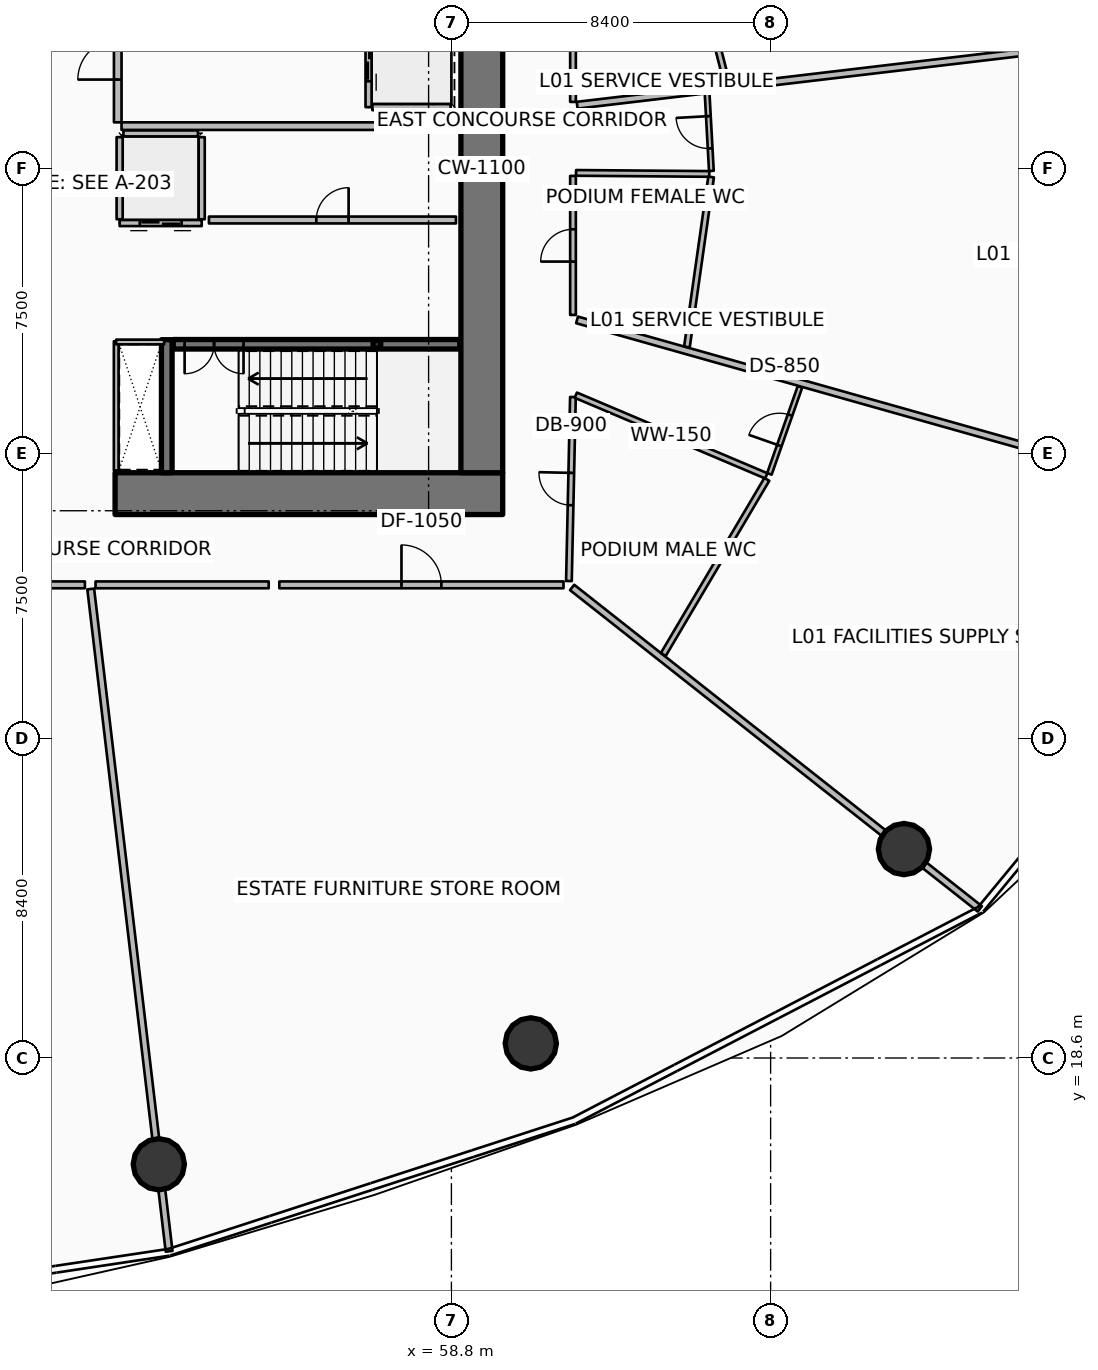
"""IFC4 building model, lengths in metres.
Left out: names, types, materials, properties, quantities, classifications, styles, units other than length and angle.
Written with IfcOpenShell. Run it as: python <this file> out.ifc"""

import sys

from ifc_helpers import new_model, si_unit, direction, frame, frame_2d, origin, origin_2d, place, context, subcontext, project, spatial, rectangle, hollow_rectangle, circle, extrude, element, fill, save


model = new_model("IFC4")
c1 = context("Model", 3, precision=1e-05, world=origin(), true_north=direction((0.0, 1.0)))
c2 = subcontext(c1, "Body", "Model", "MODEL_VIEW")
j1 = project(units=[si_unit("LENGTHUNIT", "METRE"), si_unit("PLANEANGLEUNIT", "RADIAN")], contexts=[c1])
p1 = place(None, origin())
s1 = spatial("IfcSite", under=j1, at=p1, CompositionType="ELEMENT")
p2 = place(p1, origin())
s2 = spatial("IfcBuilding", under=s1, at=p2, CompositionType="ELEMENT")
p3 = place(p2, frame((0.0, 0.0, 7.2)))
s3 = spatial("IfcBuildingStorey", under=s2, at=p3, CompositionType="ELEMENT", Elevation=7.2)
p4 = place(p3, frame((49.95, 33.45, 0.0), z_axis=(0.0, 0.0, 1.0), x_axis=(1.0, 0.0, 0.0)))
e1 = element("IfcWall", 1, at=p4, inside=s3, PredefinedType="SHEAR", context=c2, shape_type="SweptSolid", body=[
    extrude(rectangle(XDim=10.2, YDim=1.1, at=frame_2d((5.1, 0.0))), origin(), (0.0, 0.0, 1.0), 4.8),
])
p5 = place(p3, frame((59.6, 34.0, 0.0), z_axis=(0.0, 0.0, 1.0), x_axis=(0.0, 1.0, 0.0)))
e2 = element("IfcWall", 2, at=p5, inside=s3, PredefinedType="SHEAR", context=c2, shape_type="SweptSolid", body=[
    extrude(rectangle(XDim=16.0, YDim=1.1, at=frame_2d((8.0, 0.0))), origin(), (0.0, 0.0, 1.0), 4.8),
])
p6 = place(p3, frame((51.31, 34.0, 0.0), z_axis=(0.0, 0.0, 1.0), x_axis=(0.0, 1.0, 0.0)))
e3 = element("IfcWall", 3, at=p6, inside=s3, PredefinedType="SHEAR", context=c2, shape_type="SweptSolid", body=[
    extrude(rectangle(XDim=3.5, YDim=0.28, at=frame_2d((1.75, 0.0))), origin(), (0.0, 0.0, 1.0), 4.8),
])
p7 = place(p3, frame((56.84, 37.38, 0.0), z_axis=(0.0, 0.0, 1.0), x_axis=(1.0, 0.0, 0.0)))
e4 = element("IfcColumn", 4, at=p7, inside=s3, PredefinedType="COLUMN", context=c2, shape_type="SweptSolid", body=[
    extrude(hollow_rectangle(XDim=0.2, YDim=0.2, WallThickness=0.01, InnerFilletRadius=0.01, OuterFilletRadius=0.02, at=origin_2d()), origin(), (0.0, 0.0, 1.0), 2.195),
])
for number, where, z_axis, x_axis in (
    (5, (51.101, 15.804, 0.0), (0.0, 0.0, 1.0), (1.0, 0.0, 0.0)),
    (6, (60.889, 18.984, 0.0), (0.0, 0.0, 1.0), (1.0, 0.0, 0.0)),
    (7, (70.709, 24.098, 0.0), (0.0, 0.0, 1.0), (1.0, 0.0, 0.0)),
):
    element("IfcColumn", number, at=place(p3, frame(where, z_axis=z_axis, x_axis=x_axis)), inside=s3, PredefinedType="COLUMN", context=c2, shape_type="SweptSolid", body=[
        extrude(circle(Radius=0.675, at=origin_2d()), origin(), (0.0, 0.0, 1.0), 4.48),
    ])
p8 = place(p3, frame((51.48, 37.38, 0.0), z_axis=(0.0, 0.0, 1.0), x_axis=(1.0, 0.0, 0.0)))
e8 = element("IfcWall", 8, at=p8, inside=s3, PredefinedType="SOLIDWALL", context=c2, shape_type="SweptSolid", body=[
    extrude(rectangle(XDim=7.54, YDim=0.25, at=frame_2d((3.77, 0.0))), origin(), (0.0, 0.0, 1.0), 4.48),
])
p9 = place(p8, frame((0.3, 0.0, 0.0)))
e9 = element("IfcOpeningElement", 9, at=p9, cuts=e8, PredefinedType="OPENING", context=c2, shape_type="SweptSolid", body=[
    extrude(rectangle(XDim=1.55, YDim=2.15, at=frame_2d((0.775, 1.075))), frame((0.0, 0.135, 0.0), z_axis=(0.0, -1.0, 0.0), x_axis=(1.0, 0.0, 0.0)), (0.0, 0.0, 1.0), 0.27),
])
p10 = place(p3, frame((56.62, 46.08, 0.0), z_axis=(0.0, 0.0, 1.0), x_axis=(0.0, -1.0, 0.0)))
e10 = element("IfcWall", 10, at=p10, inside=s3, PredefinedType="PARTITIONING", context=c2, shape_type="SweptSolid", body=[
    extrude(rectangle(XDim=2.46, YDim=0.16, at=frame_2d((1.23, 0.0))), origin(), (0.0, 0.0, 1.0), 4.48),
])
p11 = place(p10, frame((0.68, 0.0, 0.0)))
e11 = element("IfcOpeningElement", 11, at=p11, cuts=e10, PredefinedType="OPENING", context=c2, shape_type="SweptSolid", body=[
    extrude(rectangle(XDim=1.1, YDim=2.1, at=frame_2d((0.55, 1.05))), frame((0.0, 0.09, 0.0), z_axis=(0.0, -1.0, 0.0), x_axis=(1.0, 0.0, 0.0)), (0.0, 0.0, 1.0), 0.18),
])
p12 = place(p3, frame((56.72, 43.62, 0.0), z_axis=(0.0, 0.0, 1.0), x_axis=(1.0, 0.0, 0.0)))
e12 = element("IfcWall", 12, at=p12, inside=s3, PredefinedType="PARTITIONING", context=c2, shape_type="SweptSolid", body=[
    extrude(rectangle(XDim=2.06, YDim=0.16, at=frame_2d((1.03, 0.0))), origin(), (0.0, 0.0, 1.0), 4.48),
])
p13 = place(p3, frame((52.23, 40.57, 0.0), z_axis=(0.0, 0.0, 1.0), x_axis=(-1.0, 0.0, 0.0)))
e13 = element("IfcWall", 13, at=p13, inside=s3, PredefinedType="PARTITIONING", context=c2, shape_type="SweptSolid", body=[
    extrude(rectangle(XDim=2.16, YDim=0.16, at=frame_2d((1.08, 0.0))), origin(), (0.0, 0.0, 1.0), 4.48),
])
p14 = place(p13, frame((0.53, 0.0, 0.0)))
e14 = element("IfcOpeningElement", 14, at=p14, cuts=e13, PredefinedType="OPENING", context=c2, shape_type="SweptSolid", body=[
    extrude(rectangle(XDim=1.1, YDim=2.1, at=frame_2d((0.55, 1.05))), frame((0.0, 0.09, 0.0), z_axis=(0.0, -1.0, 0.0), x_axis=(1.0, 0.0, 0.0)), (0.0, 0.0, 1.0), 0.18),
])
for number, where, z_axis, x_axis in (
    (15, (52.23, 40.67, 0.0), (0.0, 0.0, 1.0), (0.0, 1.0, 0.0)),
    (16, (50.07, 40.67, 0.0), (0.0, 0.0, 1.0), (0.0, 1.0, 0.0)),
):
    element("IfcWall", number, at=place(p3, frame(where, z_axis=z_axis, x_axis=x_axis)), inside=s3, PredefinedType="PARTITIONING", context=c2, shape_type="SweptSolid", body=[
        extrude(rectangle(XDim=2.16, YDim=0.16, at=frame_2d((1.08, 0.0))), origin(), (0.0, 0.0, 1.0), 4.48),
    ])
p15 = place(p3, frame((50.17, 42.93, 0.0), z_axis=(0.0, 0.0, 1.0), x_axis=(1.0, 0.0, 0.0)))
e17 = element("IfcWall", 17, at=p15, inside=s3, PredefinedType="PARTITIONING", context=c2, shape_type="SweptSolid", body=[
    extrude(rectangle(XDim=1.96, YDim=0.16, at=frame_2d((0.98, 0.0))), origin(), (0.0, 0.0, 1.0), 4.48),
])
p16 = place(p3, frame((52.42, 40.65, 0.0), z_axis=(0.0, 0.0, 1.0), x_axis=(1.0, 0.0, 0.0)))
e18 = element("IfcWall", 18, at=p16, inside=s3, PredefinedType="PARTITIONING", context=c2, shape_type="SweptSolid", body=[
    extrude(rectangle(XDim=6.5, YDim=0.18, at=frame_2d((3.25, 0.0))), origin(), (0.0, 0.0, 1.0), 4.48),
])
p17 = place(p16, frame((2.825, 0.0, 0.0)))
e19 = element("IfcOpeningElement", 19, at=p17, cuts=e18, PredefinedType="OPENING", context=c2, shape_type="SweptSolid", body=[
    extrude(rectangle(XDim=0.85, YDim=2.06, at=frame_2d((0.425, 1.03))), frame((0.0, 0.1, 0.0), z_axis=(0.0, -1.0, 0.0), x_axis=(1.0, 0.0, 0.0)), (0.0, 0.0, 1.0), 0.2),
])
p18 = place(p3, frame((50.12, 43.12, 0.0), z_axis=(0.0, 0.0, 1.0), x_axis=(1.0, 0.0, 0.0)))
e20 = element("IfcWall", 20, at=p18, inside=s3, PredefinedType="PARTITIONING", context=c2, shape_type="SweptSolid", body=[
    extrude(rectangle(XDim=8.88, YDim=0.2, at=frame_2d((4.44, 0.0))), origin(), (0.0, 0.0, 1.0), 4.48),
])
p19 = place(p3, frame((50.02, 43.22, 0.0), z_axis=(0.0, 0.0, 1.0), x_axis=(0.0, 1.0, 0.0)))
e21 = element("IfcWall", 21, at=p19, inside=s3, PredefinedType="PARTITIONING", context=c2, shape_type="SweptSolid", body=[
    extrude(rectangle(XDim=3.3, YDim=0.2, at=frame_2d((1.65, 0.0))), origin(), (0.0, 0.0, 1.0), 4.48),
])
p20 = place(p19, frame((1.125, 0.0, 0.0)))
e22 = element("IfcOpeningElement", 22, at=p20, cuts=e21, PredefinedType="OPENING", context=c2, shape_type="SweptSolid", body=[
    extrude(rectangle(XDim=1.05, YDim=2.1, at=frame_2d((0.525, 1.05))), frame((0.0, 0.11, 0.0), z_axis=(0.0, -1.0, 0.0), x_axis=(1.0, 0.0, 0.0)), (0.0, 0.0, 1.0), 0.22),
])
p21 = place(p3, frame((49.98, 34.06, 0.0), z_axis=(0.0, 0.0, 1.0), x_axis=(0.0, 1.0, 0.0)))
e23 = element("IfcWall", 23, at=p21, inside=s3, PredefinedType="PARTITIONING", context=c2, shape_type="SweptSolid", body=[
    extrude(rectangle(XDim=3.4, YDim=0.125, at=frame_2d((1.7, 0.0))), origin(), (0.0, 0.0, 1.0), 3.92),
])
p22 = place(p3, frame((49.98, 37.44, 0.0), z_axis=(0.0, 0.0, 1.0), x_axis=(1.0, 0.0, 0.0)))
e24 = element("IfcWall", 24, at=p22, inside=s3, PredefinedType="PARTITIONING", context=c2, shape_type="SweptSolid", body=[
    extrude(rectangle(XDim=1.26, YDim=0.125, at=frame_2d((0.63, 0.0))), origin(), (0.0, 0.0, 1.0), 3.92),
])
p23 = place(p3, frame((45.052, 31.05, 0.0), z_axis=(0.0, 0.0, 1.0), x_axis=(1.0, 0.0, 0.0)))
e25 = element("IfcWall", 25, at=p23, inside=s3, PredefinedType="PARTITIONING", context=c2, shape_type="SweptSolid", body=[
    extrude(rectangle(XDim=4.104, YDim=0.18, at=frame_2d((2.052, 0.0))), origin(), (0.0, 0.0, 1.0), 3.693),
])
p24 = place(p3, frame((49.309, 30.941, 0.0), z_axis=(0.0, 0.0, 1.0), x_axis=(0.117547531601, -0.993067257448, 0.0)))
e26 = element("IfcWall", 26, at=p24, inside=s3, PredefinedType="PARTITIONING", context=c2, shape_type="SweptSolid", body=[
    extrude(rectangle(XDim=17.548, YDim=0.18, at=frame_2d((8.774, 0.0))), origin(), (0.0, 0.0, 1.0), 3.693),
])
p25 = place(p3, frame((49.436, 31.05, 0.0), z_axis=(0.0, 0.0, 1.0), x_axis=(1.0, 0.0, 0.0)))
e27 = element("IfcWall", 27, at=p25, inside=s3, PredefinedType="PARTITIONING", context=c2, shape_type="SweptSolid", body=[
    extrude(rectangle(XDim=4.556, YDim=0.18, at=frame_2d((2.278, 0.0))), origin(), (0.0, 0.0, 1.0), 3.693),
])
p26 = place(p3, frame((54.272, 31.05, 0.0), z_axis=(0.0, 0.0, 1.0), x_axis=(1.0, 0.0, 0.0)))
e28 = element("IfcWall", 28, at=p26, inside=s3, PredefinedType="PARTITIONING", context=c2, shape_type="SweptSolid", body=[
    extrude(rectangle(XDim=7.478, YDim=0.18, at=frame_2d((3.739, 0.0))), origin(), (0.0, 0.0, 1.0), 3.693),
])
p27 = place(p26, frame((3.214, 0.0, 0.0)))
e29 = element("IfcOpeningElement", 29, at=p27, cuts=e28, PredefinedType="OPENING", context=c2, shape_type="SweptSolid", body=[
    extrude(rectangle(XDim=1.05, YDim=2.1, at=frame_2d((0.525, 1.05))), frame((0.0, 0.1, 0.0), z_axis=(0.0, -1.0, 0.0), x_axis=(1.0, 0.0, 0.0)), (0.0, 0.0, 1.0), 0.2),
])
p28 = place(p3, frame((61.976, 30.982, 0.0), z_axis=(0.0, 0.0, 1.0), x_axis=(0.785315783489, -0.619095404766, 0.0)))
e30 = element("IfcWall", 30, at=p28, inside=s3, PredefinedType="PARTITIONING", context=c2, shape_type="SweptSolid", body=[
    extrude(rectangle(XDim=13.661, YDim=0.18, at=frame_2d((6.831, 0.0))), origin(), (0.0, 0.0, 1.0), 3.693),
])
p29 = place(p3, frame((61.892, 31.15, 0.0), z_axis=(0.0, 0.0, 1.0), x_axis=(0.021928973177, 0.999759531155, 0.0)))
e31 = element("IfcWall", 31, at=p29, inside=s3, PredefinedType="PARTITIONING", context=c2, shape_type="SweptSolid", body=[
    extrude(rectangle(XDim=4.843, YDim=0.15, at=frame_2d((2.421, 0.0))), origin(), (0.0, 0.0, 1.0), 3.693),
])
p30 = place(p29, frame((1.997, 0.0, 0.0)))
e32 = element("IfcOpeningElement", 32, at=p30, cuts=e31, PredefinedType="OPENING", context=c2, shape_type="SweptSolid", body=[
    extrude(rectangle(XDim=0.85, YDim=2.06, at=frame_2d((0.425, 1.03))), frame((0.0, 0.085, 0.0), z_axis=(0.0, -1.0, 0.0), x_axis=(1.0, 0.0, 0.0)), (0.0, 0.0, 1.0), 0.17),
])
p31 = place(p3, frame((62.074, 36.041, 0.0), z_axis=(0.0, 0.0, 1.0), x_axis=(0.920841540816, -0.38993699069, 0.0)))
e33 = element("IfcWall", 33, at=p31, inside=s3, PredefinedType="PARTITIONING", context=c2, shape_type="SweptSolid", body=[
    extrude(rectangle(XDim=5.443, YDim=0.15, at=frame_2d((2.722, 0.0))), origin(), (0.0, 0.0, 1.0), 3.92),
])
p32 = place(p3, frame((64.375, 29.217, 0.0), z_axis=(0.0, 0.0, 1.0), x_axis=(0.509047270842, 0.860738564286, 0.0)))
e34 = element("IfcWall", 34, at=p32, inside=s3, PredefinedType="PARTITIONING", context=c2, shape_type="SweptSolid", body=[
    extrude(rectangle(XDim=5.354, YDim=0.15, at=frame_2d((2.677, 0.0))), origin(), (0.0, 0.0, 1.0), 3.693),
])
p33 = place(p3, frame((67.168, 33.97, 0.0), z_axis=(0.0, 0.0, 1.0), x_axis=(0.331316814656, 0.943519564358, 0.0)))
e35 = element("IfcWall", 35, at=p33, inside=s3, PredefinedType="PARTITIONING", context=c2, shape_type="SweptSolid", body=[
    extrude(rectangle(XDim=2.43, YDim=0.125, at=frame_2d((1.215, 0.0))), origin(), (0.0, 0.0, 1.0), 3.693),
])
p34 = place(p33, frame((0.79, 0.0, 0.0)))
e36 = element("IfcOpeningElement", 36, at=p34, cuts=e35, PredefinedType="OPENING", context=c2, shape_type="SweptSolid", body=[
    extrude(rectangle(XDim=0.85, YDim=2.06, at=frame_2d((0.425, 1.03))), frame((0.0, 0.073, 0.0), z_axis=(0.0, -1.0, 0.0), x_axis=(1.0, 0.0, 0.0)), (0.0, 0.0, 1.0), 0.145),
])
p35 = place(p3, frame((62.106, 38.022, 0.0), z_axis=(0.0, 0.0, 1.0), x_axis=(0.962455233657, -0.271440459782, 0.0)))
e37 = element("IfcWall", 37, at=p35, inside=s3, PredefinedType="PARTITIONING", context=c2, shape_type="SweptSolid", body=[
    extrude(rectangle(XDim=19.716, YDim=0.18, at=frame_2d((9.858, 0.0))), origin(), (0.0, 0.0, 1.0), 3.693),
])
p36 = place(p3, frame((62.0, 38.152, 0.0), z_axis=(0.0, 0.0, 1.0), x_axis=(0.0, 1.0, 0.0)))
e38 = element("IfcWall", 38, at=p36, inside=s3, PredefinedType="PARTITIONING", context=c2, shape_type="SweptSolid", body=[
    extrude(rectangle(XDim=3.658, YDim=0.15, at=frame_2d((1.829, 0.0))), origin(), (0.0, 0.0, 1.0), 3.693),
])
p37 = place(p36, frame((1.404, 0.0, 0.0)))
e39 = element("IfcOpeningElement", 39, at=p37, cuts=e38, PredefinedType="OPENING", context=c2, shape_type="SweptSolid", body=[
    extrude(rectangle(XDim=0.85, YDim=2.06, at=frame_2d((0.425, 1.03))), frame((0.0, 0.085, 0.0), z_axis=(0.0, -1.0, 0.0), x_axis=(1.0, 0.0, 0.0)), (0.0, 0.0, 1.0), 0.17),
])
p38 = place(p3, frame((62.08, 41.889, 0.0), z_axis=(0.0, 0.0, 1.0), x_axis=(0.999969031596, -0.007869933178, 0.0)))
e40 = element("IfcWall", 40, at=p38, inside=s3, PredefinedType="PARTITIONING", context=c2, shape_type="SweptSolid", body=[
    extrude(rectangle(XDim=3.505, YDim=0.15, at=frame_2d((1.753, 0.0))), origin(), (0.0, 0.0, 1.0), 3.92),
])
p39 = place(p3, frame((64.998, 37.309, 0.0), z_axis=(0.0, 0.0, 1.0), x_axis=(0.140922059176, 0.990020693338, 0.0)))
e41 = element("IfcWall", 41, at=p39, inside=s3, PredefinedType="PARTITIONING", context=c2, shape_type="SweptSolid", body=[
    extrude(rectangle(XDim=4.518, YDim=0.15, at=frame_2d((2.259, 0.0))), origin(), (0.0, 0.0, 1.0), 3.693),
])
p40 = place(p3, frame((65.641, 41.941, 0.0), z_axis=(0.0, 0.0, 1.0), x_axis=(-0.054918793983, 0.998490824228, 0.0)))
e42 = element("IfcWall", 42, at=p40, inside=s3, PredefinedType="PARTITIONING", context=c2, shape_type="SweptSolid", body=[
    extrude(rectangle(XDim=2.036, YDim=0.125, at=frame_2d((1.018, 0.0))), origin(), (0.0, 0.0, 1.0), 3.693),
])
p41 = place(p40, frame((0.593, 0.0, 0.0)))
e43 = element("IfcOpeningElement", 43, at=p41, cuts=e42, PredefinedType="OPENING", context=c2, shape_type="SweptSolid", body=[
    extrude(rectangle(XDim=0.85, YDim=2.06, at=frame_2d((0.425, 1.03))), frame((0.0, 0.073, 0.0), z_axis=(0.0, -1.0, 0.0), x_axis=(1.0, 0.0, 0.0)), (0.0, 0.0, 1.0), 0.145),
])
p42 = place(p3, frame((62.109, 43.67, 0.0), z_axis=(0.0, 0.0, 1.0), x_axis=(0.993068665713, 0.117535633659, 0.0)))
e44 = element("IfcWall", 44, at=p42, inside=s3, PredefinedType="PARTITIONING", context=c2, shape_type="SweptSolid", body=[
    extrude(rectangle(XDim=21.133, YDim=0.18, at=frame_2d((10.566, 0.0))), origin(), (0.0, 0.0, 1.0), 3.693),
])
p43 = place(p3, frame((62.0, 43.757, 0.0), z_axis=(0.0, 0.0, 1.0), x_axis=(0.0, 1.0, 0.0)))
e45 = element("IfcWall", 45, at=p43, inside=s3, PredefinedType="PARTITIONING", context=c2, shape_type="SweptSolid", body=[
    extrude(rectangle(XDim=3.833, YDim=0.15, at=frame_2d((1.917, 0.0))), origin(), (0.0, 0.0, 1.0), 3.693),
])
p44 = place(p43, frame((1.492, 0.0, 0.0)))
e46 = element("IfcOpeningElement", 46, at=p44, cuts=e45, PredefinedType="OPENING", context=c2, shape_type="SweptSolid", body=[
    extrude(rectangle(XDim=0.85, YDim=2.06, at=frame_2d((0.425, 1.03))), frame((0.0, 0.085, 0.0), z_axis=(0.0, -1.0, 0.0), x_axis=(1.0, 0.0, 0.0)), (0.0, 0.0, 1.0), 0.17),
])
p45 = place(p3, frame((66.054, 44.237, 0.0), z_axis=(0.0, 0.0, 1.0), x_axis=(-0.248710144761, 0.968577959636, 0.0)))
e47 = element("IfcWall", 47, at=p45, inside=s3, PredefinedType="PARTITIONING", context=c2, shape_type="SweptSolid", body=[
    extrude(rectangle(XDim=4.667, YDim=0.15, at=frame_2d((2.333, 0.0))), origin(), (0.0, 0.0, 1.0), 3.693),
])
p46 = place(p9, origin())
e48 = element("IfcDoor", 48, at=p46, inside=s3, OperationType="DOUBLE_DOOR_SINGLE_SWING", PredefinedType="DOOR", context=c2, shape_type="SweptSolid", body=[
    extrude(rectangle(XDim=1.55, YDim=2.15, at=frame_2d((0.775, 1.075))), frame((0.0, 0.025, 0.0), z_axis=(0.0, -1.0, 0.0), x_axis=(1.0, 0.0, 0.0)), (0.0, 0.0, 1.0), 0.05),
])
fill(e9, e48)
p47 = place(p11, origin())
e49 = element("IfcDoor", 49, at=p47, inside=s3, OperationType="DOUBLE_DOOR_SLIDING", PredefinedType="DOOR", context=c2, shape_type="SweptSolid", body=[
    extrude(rectangle(XDim=1.1, YDim=2.1, at=frame_2d((0.55, 1.05))), frame((0.0, 0.025, 0.0), z_axis=(0.0, -1.0, 0.0), x_axis=(1.0, 0.0, 0.0)), (0.0, 0.0, 1.0), 0.05),
])
fill(e11, e49)
p48 = place(p14, origin())
e50 = element("IfcDoor", 50, at=p48, inside=s3, OperationType="DOUBLE_DOOR_SLIDING", PredefinedType="DOOR", context=c2, shape_type="SweptSolid", body=[
    extrude(rectangle(XDim=1.1, YDim=2.1, at=frame_2d((0.55, 1.05))), frame((0.0, 0.025, 0.0), z_axis=(0.0, -1.0, 0.0), x_axis=(1.0, 0.0, 0.0)), (0.0, 0.0, 1.0), 0.05),
])
fill(e14, e50)
p49 = place(p17, origin())
e51 = element("IfcDoor", 51, at=p49, inside=s3, OperationType="SINGLE_SWING_RIGHT", PredefinedType="DOOR", context=c2, shape_type="SweptSolid", body=[
    extrude(rectangle(XDim=0.85, YDim=2.06, at=frame_2d((0.425, 1.03))), frame((0.0, 0.025, 0.0), z_axis=(0.0, -1.0, 0.0), x_axis=(1.0, 0.0, 0.0)), (0.0, 0.0, 1.0), 0.05),
])
fill(e19, e51)
p50 = place(p20, origin())
e52 = element("IfcDoor", 52, at=p50, inside=s3, OperationType="SINGLE_SWING_LEFT", PredefinedType="DOOR", context=c2, shape_type="SweptSolid", body=[
    extrude(rectangle(XDim=1.05, YDim=2.1, at=frame_2d((0.525, 1.05))), frame((0.0, 0.025, 0.0), z_axis=(0.0, -1.0, 0.0), x_axis=(1.0, 0.0, 0.0)), (0.0, 0.0, 1.0), 0.05),
])
fill(e22, e52)
p51 = place(p27, origin())
e53 = element("IfcDoor", 53, at=p51, inside=s3, OperationType="SINGLE_SWING_LEFT", PredefinedType="DOOR", context=c2, shape_type="SweptSolid", body=[
    extrude(rectangle(XDim=1.05, YDim=2.1, at=frame_2d((0.525, 1.05))), frame((0.0, 0.025, 0.0), z_axis=(0.0, -1.0, 0.0), x_axis=(1.0, 0.0, 0.0)), (0.0, 0.0, 1.0), 0.05),
])
fill(e29, e53)
p52 = place(p30, origin())
e54 = element("IfcDoor", 54, at=p52, inside=s3, OperationType="SINGLE_SWING_RIGHT", PredefinedType="DOOR", context=c2, shape_type="SweptSolid", body=[
    extrude(rectangle(XDim=0.85, YDim=2.06, at=frame_2d((0.425, 1.03))), frame((0.0, 0.025, 0.0), z_axis=(0.0, -1.0, 0.0), x_axis=(1.0, 0.0, 0.0)), (0.0, 0.0, 1.0), 0.05),
])
fill(e32, e54)
p53 = place(p34, origin())
e55 = element("IfcDoor", 55, at=p53, inside=s3, OperationType="SINGLE_SWING_LEFT", PredefinedType="DOOR", context=c2, shape_type="SweptSolid", body=[
    extrude(rectangle(XDim=0.85, YDim=2.06, at=frame_2d((0.425, 1.03))), frame((0.0, 0.025, 0.0), z_axis=(0.0, -1.0, 0.0), x_axis=(1.0, 0.0, 0.0)), (0.0, 0.0, 1.0), 0.05),
])
fill(e36, e55)
p54 = place(p37, origin())
e56 = element("IfcDoor", 56, at=p54, inside=s3, OperationType="SINGLE_SWING_LEFT", PredefinedType="DOOR", context=c2, shape_type="SweptSolid", body=[
    extrude(rectangle(XDim=0.85, YDim=2.06, at=frame_2d((0.425, 1.03))), frame((0.0, 0.025, 0.0), z_axis=(0.0, -1.0, 0.0), x_axis=(1.0, 0.0, 0.0)), (0.0, 0.0, 1.0), 0.05),
])
fill(e39, e56)
p55 = place(p41, origin())
e57 = element("IfcDoor", 57, at=p55, inside=s3, OperationType="SINGLE_SWING_RIGHT", PredefinedType="DOOR", context=c2, shape_type="SweptSolid", body=[
    extrude(rectangle(XDim=0.85, YDim=2.06, at=frame_2d((0.425, 1.03))), frame((0.0, 0.025, 0.0), z_axis=(0.0, -1.0, 0.0), x_axis=(1.0, 0.0, 0.0)), (0.0, 0.0, 1.0), 0.05),
])
fill(e43, e57)
save(model, sys.argv[1])
